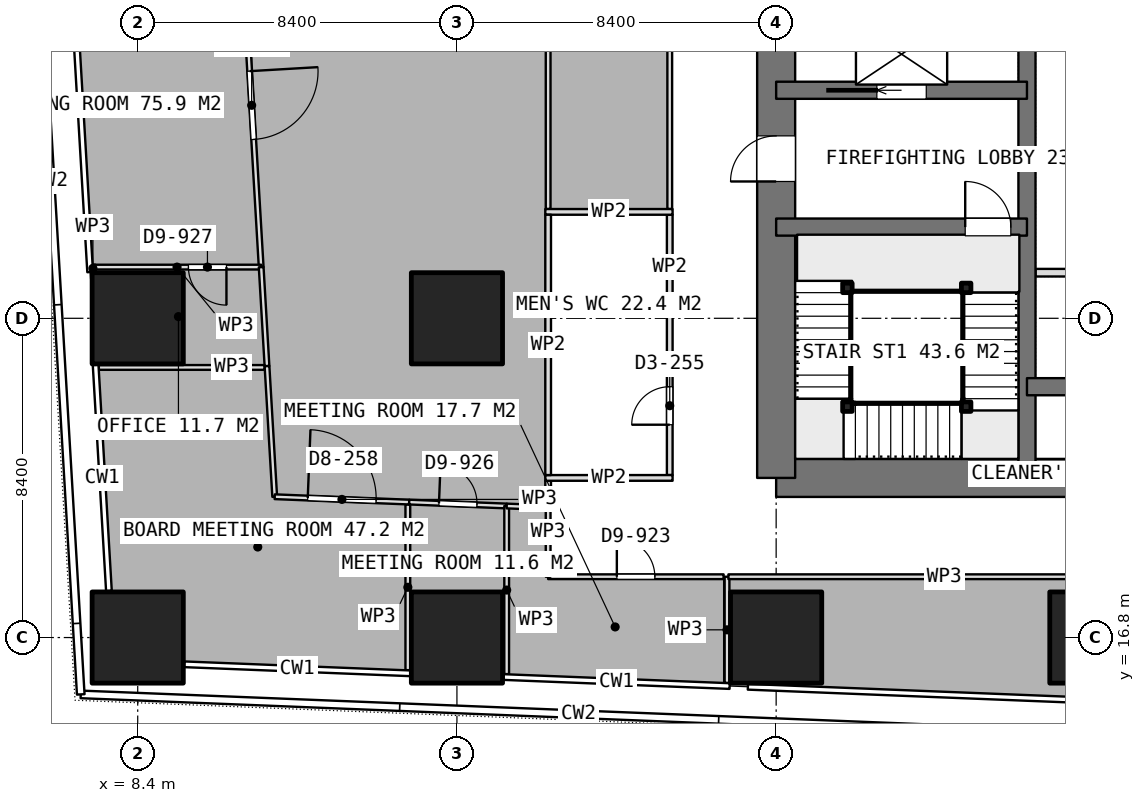
"""IFC4 building model, lengths in metres.
Left out: names, types, materials, properties, quantities, classifications, styles, units other than length and angle.
Written with IfcOpenShell. Run it as: python <this file> out.ifc"""

import sys

from ifc_helpers import new_model, si_unit, direction, frame, frame_2d, origin, origin_2d, place, context, subcontext, project, spatial, rectangle, extrude, element, fill, save


model = new_model("IFC4")
c1 = context("Model", 3, precision=1e-05, world=origin(), true_north=direction((0.0, 1.0)))
c2 = subcontext(c1, "Body", "Model", "MODEL_VIEW")
j1 = project(units=[si_unit("LENGTHUNIT", "METRE"), si_unit("PLANEANGLEUNIT", "RADIAN")], contexts=[c1])
p1 = place(None, origin())
s1 = spatial("IfcSite", under=j1, at=p1, CompositionType="ELEMENT")
p2 = place(p1, origin())
s2 = spatial("IfcBuilding", under=s1, at=p2, CompositionType="ELEMENT")
p3 = place(p2, frame((0.0, 0.0, 236.45)))
s3 = spatial("IfcBuildingStorey", under=s2, at=p3, CompositionType="ELEMENT", Elevation=236.45)
p4 = place(p3, frame((25.2, 21.0, 0.0), z_axis=(0.0, 0.0, 1.0), x_axis=(1.0, 0.0, 0.0)))
e1 = element("IfcWall", 1, at=p4, inside=s3, PredefinedType="SHEAR", context=c2, shape_type="SweptSolid", body=[
    extrude(rectangle(XDim=10.4, YDim=1.0, at=frame_2d((5.2, 0.0))), origin(), (0.0, 0.0, 1.0), 3.75),
])
p5 = place(p3, frame((25.2, 21.0, 0.0), z_axis=(0.0, 0.0, 1.0), x_axis=(0.0, 1.0, 0.0)))
e2 = element("IfcWall", 2, at=p5, inside=s3, PredefinedType="SHEAR", context=c2, shape_type="SweptSolid", body=[
    extrude(rectangle(XDim=25.2, YDim=1.0, at=frame_2d((12.6, 0.0))), origin(), (0.0, 0.0, 1.0), 3.75),
])
p6 = place(p5, frame((7.8, 0.0, 0.0)))
e3 = element("IfcOpeningElement", 3, at=p6, cuts=e2, PredefinedType="OPENING", context=c2, shape_type="SweptSolid", body=[
    extrude(rectangle(XDim=1.2, YDim=2.1, at=frame_2d((0.6, 1.05))), frame((0.0, 0.51, 0.0), z_axis=(0.0, -1.0, 0.0), x_axis=(1.0, 0.0, 0.0)), (0.0, 0.0, 1.0), 1.02),
])
p7 = place(p5, frame((14.25, 0.0, 0.0)))
e4 = element("IfcOpeningElement", 4, at=p7, cuts=e2, PredefinedType="OPENING", context=c2, shape_type="SweptSolid", body=[
    extrude(rectangle(XDim=0.9, YDim=2.1, at=frame_2d((0.45, 1.05))), frame((0.0, 0.51, 0.0), z_axis=(0.0, -1.0, 0.0), x_axis=(1.0, 0.0, 0.0)), (0.0, 0.0, 1.0), 1.02),
])
p8 = place(p5, frame((16.85, 0.0, 0.0)))
e5 = element("IfcOpeningElement", 5, at=p8, cuts=e2, PredefinedType="OPENING", context=c2, shape_type="SweptSolid", body=[
    extrude(rectangle(XDim=0.9, YDim=2.1, at=frame_2d((0.45, 1.05))), frame((0.0, 0.51, 0.0), z_axis=(0.0, -1.0, 0.0), x_axis=(1.0, 0.0, 0.0)), (0.0, 0.0, 1.0), 1.02),
])
p9 = place(p5, frame((19.025, 0.0, 0.0)))
e6 = element("IfcOpeningElement", 6, at=p9, cuts=e2, PredefinedType="OPENING", context=c2, shape_type="SweptSolid", body=[
    extrude(rectangle(XDim=1.2, YDim=2.1, at=frame_2d((0.6, 1.05))), frame((0.0, 0.51, 0.0), z_axis=(0.0, -1.0, 0.0), x_axis=(1.0, 0.0, 0.0)), (0.0, 0.0, 1.0), 1.02),
])
p10 = place(p3, frame((31.8, 21.0, 0.0), z_axis=(0.0, 0.0, 1.0), x_axis=(0.0, 1.0, 0.0)))
e7 = element("IfcWall", 7, at=p10, inside=s3, PredefinedType="SHEAR", context=c2, shape_type="SweptSolid", body=[
    extrude(rectangle(XDim=25.2, YDim=0.45, at=frame_2d((12.6, 0.0))), origin(), (0.0, 0.0, 1.0), 3.75),
])
p11 = place(p3, frame((31.8, 23.4, 0.0), z_axis=(0.0, 0.0, 1.0), x_axis=(1.0, 0.0, 0.0)))
e8 = element("IfcWall", 8, at=p11, inside=s3, PredefinedType="SHEAR", context=c2, shape_type="SweptSolid", body=[
    extrude(rectangle(XDim=3.8, YDim=0.45, at=frame_2d((1.9, 0.0))), origin(), (0.0, 0.0, 1.0), 3.75),
])
p12 = place(p3, frame((25.2, 27.6, 0.0), z_axis=(0.0, 0.0, 1.0), x_axis=(1.0, 0.0, 0.0)))
e9 = element("IfcWall", 9, at=p12, inside=s3, PredefinedType="SHEAR", context=c2, shape_type="SweptSolid", body=[
    extrude(rectangle(XDim=6.6, YDim=0.45, at=frame_2d((3.3, 0.0))), origin(), (0.0, 0.0, 1.0), 3.75),
])
p13 = place(p12, frame((4.975, 0.0, 0.0)))
e10 = element("IfcOpeningElement", 10, at=p13, cuts=e9, PredefinedType="OPENING", context=c2, shape_type="SweptSolid", body=[
    extrude(rectangle(XDim=1.2, YDim=2.1, at=frame_2d((0.6, 1.05))), frame((0.0, 0.235, 0.0), z_axis=(0.0, -1.0, 0.0), x_axis=(1.0, 0.0, 0.0)), (0.0, 0.0, 1.0), 0.47),
])
p14 = place(p3, frame((25.2, 31.2, 0.0), z_axis=(0.0, 0.0, 1.0), x_axis=(1.0, 0.0, 0.0)))
e11 = element("IfcWall", 11, at=p14, inside=s3, PredefinedType="SHEAR", context=c2, shape_type="SweptSolid", body=[
    extrude(rectangle(XDim=6.6, YDim=0.45, at=frame_2d((3.3, 0.0))), origin(), (0.0, 0.0, 1.0), 3.75),
])
p15 = place(p14, frame((2.65, 0.0, 0.0)))
e12 = element("IfcOpeningElement", 12, at=p15, cuts=e11, PredefinedType="OPENING", context=c2, shape_type="SweptSolid", body=[
    extrude(rectangle(XDim=1.3, YDim=2.1, at=frame_2d((0.65, 1.05))), frame((0.0, 0.235, 0.0), z_axis=(0.0, -1.0, 0.0), x_axis=(1.0, 0.0, 0.0)), (0.0, 0.0, 1.0), 0.47),
])
for number, where, z_axis, x_axis in (
    (13, (8.4, 16.8, 0.0), (0.0, 0.0, 1.0), (1.0, 0.0, 0.0)),
    (14, (8.4, 25.2, 0.0), (0.0, 0.0, 1.0), (1.0, 0.0, 0.0)),
    (15, (16.8, 16.8, 0.0), (0.0, 0.0, 1.0), (1.0, 0.0, 0.0)),
    (16, (16.8, 25.2, 0.0), (0.0, 0.0, 1.0), (1.0, 0.0, 0.0)),
    (17, (25.2, 16.8, 0.0), (0.0, 0.0, 1.0), (1.0, 0.0, 0.0)),
    (18, (33.6, 16.8, 0.0), (0.0, 0.0, 1.0), (1.0, 0.0, 0.0)),
):
    element("IfcColumn", number, at=place(p3, frame(where, z_axis=z_axis, x_axis=x_axis)), inside=s3, PredefinedType="COLUMN", context=c2, shape_type="SweptSolid", body=[
        extrude(rectangle(XDim=2.4, YDim=2.4, at=origin_2d()), origin(), (0.0, 0.0, 1.0), 3.75),
    ])
for number, where, z_axis, x_axis in (
    (19, (32.025, 26.4, 0.0), (0.0, 0.0, 1.0), (1.0, 0.0, 0.0)),
    (20, (32.025, 29.4, 0.0), (0.0, 0.0, 1.0), (1.0, 0.0, 0.0)),
):
    element("IfcWall", number, at=place(p3, frame(where, z_axis=z_axis, x_axis=x_axis)), inside=s3, PredefinedType="PARTITIONING", context=c2, shape_type="SweptSolid", body=[
        extrude(rectangle(XDim=3.075, YDim=0.2, at=frame_2d((1.538, 0.0))), origin(), (0.0, 0.0, 1.0), 3.4),
    ])
for number, where, z_axis, x_axis in (
    (21, (19.125, 21.0, 0.0), (0.0, 0.0, 1.0), (1.0, 0.0, 0.0)),
    (22, (19.125, 28.0, 0.0), (0.0, 0.0, 1.0), (1.0, 0.0, 0.0)),
):
    element("IfcWall", number, at=place(p3, frame(where, z_axis=z_axis, x_axis=x_axis)), inside=s3, PredefinedType="PARTITIONING", context=c2, shape_type="SweptSolid", body=[
        extrude(rectangle(XDim=3.35, YDim=0.15, at=frame_2d((1.675, 0.0))), origin(), (0.0, 0.0, 1.0), 3.4),
    ])
p16 = place(p3, frame((19.2, 21.075, 0.0), z_axis=(0.0, 0.0, 1.0), x_axis=(0.0, 1.0, 0.0)))
e23 = element("IfcWall", 23, at=p16, inside=s3, PredefinedType="PARTITIONING", context=c2, shape_type="SweptSolid", body=[
    extrude(rectangle(XDim=6.85, YDim=0.15, at=frame_2d((3.425, 0.0))), origin(), (0.0, 0.0, 1.0), 3.4),
])
p17 = place(p3, frame((22.4, 21.075, 0.0), z_axis=(0.0, 0.0, 1.0), x_axis=(0.0, 1.0, 0.0)))
e24 = element("IfcWall", 24, at=p17, inside=s3, PredefinedType="PARTITIONING", context=c2, shape_type="SweptSolid", body=[
    extrude(rectangle(XDim=6.85, YDim=0.15, at=frame_2d((3.425, 0.0))), origin(), (0.0, 0.0, 1.0), 3.4),
])
p18 = place(p17, frame((1.325, 0.0, 0.0)))
e25 = element("IfcOpeningElement", 25, at=p18, cuts=e24, PredefinedType="OPENING", context=c2, shape_type="SweptSolid", body=[
    extrude(rectangle(XDim=1.0, YDim=2.1, at=frame_2d((0.5, 1.05))), frame((0.0, 0.085, 0.0), z_axis=(0.0, -1.0, 0.0), x_axis=(1.0, 0.0, 0.0)), (0.0, 0.0, 1.0), 0.17),
])
p19 = place(p3, frame((23.907, 15.606, 0.0), z_axis=(0.0, 0.0, 1.0), x_axis=(0.0, 1.0, 0.0)))
e26 = element("IfcWall", 26, at=p19, inside=s3, PredefinedType="PARTITIONING", context=c2, shape_type="SweptSolid", body=[
    extrude(rectangle(XDim=2.794, YDim=0.125, at=frame_2d((1.397, 0.0))), origin(), (0.0, 0.0, 1.0), 3.4),
])
p20 = place(p3, frame((23.944, 18.4, 0.0), z_axis=(0.0, 0.0, 1.0), x_axis=(1.0, 0.0, 0.0)))
e27 = element("IfcWall", 27, at=p20, inside=s3, PredefinedType="PARTITIONING", context=c2, shape_type="SweptSolid", body=[
    extrude(rectangle(XDim=28.401, YDim=0.125, at=frame_2d((14.2, 0.0))), origin(), (0.0, 0.0, 1.0), 3.4),
])
p21 = place(p20, frame((13.701, 0.0, 0.0)))
e28 = element("IfcOpeningElement", 28, at=p21, cuts=e27, PredefinedType="OPENING", context=c2, shape_type="SweptSolid", body=[
    extrude(rectangle(XDim=1.0, YDim=2.1, at=frame_2d((0.5, 1.05))), frame((0.0, 0.073, 0.0), z_axis=(0.0, -1.0, 0.0), x_axis=(1.0, 0.0, 0.0)), (0.0, 0.0, 1.0), 0.145),
])
p22 = place(p3, frame((11.148, 35.061, 0.0), z_axis=(0.0, 0.0, 1.0), x_axis=(0.058740480754, -0.998273287192, 0.0)))
e29 = element("IfcWall", 29, at=p22, inside=s3, PredefinedType="PARTITIONING", context=c2, shape_type="SweptSolid", body=[
    extrude(rectangle(XDim=8.529, YDim=0.125, at=frame_2d((4.264, 0.0))), origin(), (0.0, 0.0, 1.0), 3.4),
])
p23 = place(p22, frame((3.364, 0.0, 0.0)))
e30 = element("IfcOpeningElement", 30, at=p23, cuts=e29, PredefinedType="OPENING", context=c2, shape_type="SweptSolid", body=[
    extrude(rectangle(XDim=1.8, YDim=2.1, at=frame_2d((0.9, 1.05))), frame((0.0, 0.073, 0.0), z_axis=(0.0, -1.0, 0.0), x_axis=(1.0, 0.0, 0.0)), (0.0, 0.0, 1.0), 0.145),
])
p24 = place(p3, frame((11.649, 26.547, 0.0), z_axis=(0.0, 0.0, 1.0), x_axis=(-1.0, 0.0, 0.0)))
e31 = element("IfcWall", 31, at=p24, inside=s3, PredefinedType="PARTITIONING", context=c2, shape_type="SweptSolid", body=[
    extrude(rectangle(XDim=4.428, YDim=0.125, at=frame_2d((2.214, 0.0))), origin(), (0.0, 0.0, 1.0), 3.4),
])
p25 = place(p24, frame((0.914, 0.0, 0.0)))
e32 = element("IfcOpeningElement", 32, at=p25, cuts=e31, PredefinedType="OPENING", context=c2, shape_type="SweptSolid", body=[
    extrude(rectangle(XDim=1.0, YDim=2.1, at=frame_2d((0.5, 1.05))), frame((0.0, 0.073, 0.0), z_axis=(0.0, -1.0, 0.0), x_axis=(1.0, 0.0, 0.0)), (0.0, 0.0, 1.0), 0.145),
])
p26 = place(p3, frame((11.649, 26.546, 0.0), z_axis=(0.0, 0.0, 1.0), x_axis=(0.058711043696, -0.998275018894, 0.0)))
e33 = element("IfcWall", 33, at=p26, inside=s3, PredefinedType="PARTITIONING", context=c2, shape_type="SweptSolid", body=[
    extrude(rectangle(XDim=2.607, YDim=0.125, at=frame_2d((1.304, 0.0))), origin(), (0.0, 0.0, 1.0), 3.4),
])
p27 = place(p3, frame((11.741, 23.907, 0.0), z_axis=(0.0, 0.0, 1.0), x_axis=(-1.0, 0.0, 0.0)))
e34 = element("IfcWall", 34, at=p27, inside=s3, PredefinedType="PARTITIONING", context=c2, shape_type="SweptSolid", body=[
    extrude(rectangle(XDim=4.364, YDim=0.125, at=frame_2d((2.182, 0.0))), origin(), (0.0, 0.0, 1.0), 3.4),
])
p28 = place(p3, frame((15.508, 20.303, 0.0), z_axis=(0.0, 0.0, 1.0), x_axis=(0.0, -1.0, 0.0)))
e35 = element("IfcWall", 35, at=p28, inside=s3, PredefinedType="PARTITIONING", context=c2, shape_type="SweptSolid", body=[
    extrude(rectangle(XDim=4.361, YDim=0.125, at=frame_2d((2.181, 0.0))), origin(), (0.0, 0.0, 1.0), 3.4),
])
p29 = place(p3, frame((11.802, 23.942, 0.0), z_axis=(0.0, 0.0, 1.0), x_axis=(0.058925701835, -0.998262371155, 0.0)))
e36 = element("IfcWall", 36, at=p29, inside=s3, PredefinedType="PARTITIONING", context=c2, shape_type="SweptSolid", body=[
    extrude(rectangle(XDim=3.443, YDim=0.125, at=frame_2d((1.722, 0.0))), origin(), (0.0, 0.0, 1.0), 3.4),
])
p30 = place(p3, frame((12.005, 20.505, 0.0), z_axis=(0.0, 0.0, 1.0), x_axis=(0.999208321211, -0.039783549637, 0.0)))
e37 = element("IfcWall", 37, at=p30, inside=s3, PredefinedType="PARTITIONING", context=c2, shape_type="SweptSolid", body=[
    extrude(rectangle(XDim=3.541, YDim=0.125, at=frame_2d((1.771, 0.0))), origin(), (0.0, 0.0, 1.0), 3.4),
])
p31 = place(p30, frame((0.87, 0.0, 0.0)))
e38 = element("IfcOpeningElement", 38, at=p31, cuts=e37, PredefinedType="OPENING", context=c2, shape_type="SweptSolid", body=[
    extrude(rectangle(XDim=1.8, YDim=2.1, at=frame_2d((0.9, 1.05))), frame((0.0, 0.073, 0.0), z_axis=(0.0, -1.0, 0.0), x_axis=(1.0, 0.0, 0.0)), (0.0, 0.0, 1.0), 0.145),
])
p32 = place(p3, frame((15.544, 20.364, 0.0), z_axis=(0.0, 0.0, 1.0), x_axis=(0.999194259908, -0.040135158736, 0.0)))
e39 = element("IfcWall", 39, at=p32, inside=s3, PredefinedType="PARTITIONING", context=c2, shape_type="SweptSolid", body=[
    extrude(rectangle(XDim=2.567, YDim=0.125, at=frame_2d((1.283, 0.0))), origin(), (0.0, 0.0, 1.0), 3.4),
])
p33 = place(p32, frame((0.784, 0.0, 0.0)))
e40 = element("IfcOpeningElement", 40, at=p33, cuts=e39, PredefinedType="OPENING", context=c2, shape_type="SweptSolid", body=[
    extrude(rectangle(XDim=1.0, YDim=2.1, at=frame_2d((0.5, 1.05))), frame((0.0, 0.073, 0.0), z_axis=(0.0, -1.0, 0.0), x_axis=(1.0, 0.0, 0.0)), (0.0, 0.0, 1.0), 0.145),
])
p34 = place(p3, frame((18.109, 20.261, 0.0), z_axis=(0.0, 0.0, 1.0), x_axis=(0.0, -1.0, 0.0)))
e41 = element("IfcWall", 41, at=p34, inside=s3, PredefinedType="PARTITIONING", context=c2, shape_type="SweptSolid", body=[
    extrude(rectangle(XDim=4.423, YDim=0.125, at=frame_2d((2.211, 0.0))), origin(), (0.0, 0.0, 1.0), 3.4),
])
p35 = place(p3, frame((19.2, 18.4, 0.0), z_axis=(0.0, 0.0, 1.0), x_axis=(1.0, 0.0, 0.0)))
e42 = element("IfcWall", 42, at=p35, inside=s3, PredefinedType="PARTITIONING", context=c2, shape_type="SweptSolid", body=[
    extrude(rectangle(XDim=4.617, YDim=0.125, at=frame_2d((2.309, 0.0))), origin(), (0.0, 0.0, 1.0), 3.4),
])
p36 = place(p35, frame((1.808, 0.0, 0.0)))
e43 = element("IfcOpeningElement", 43, at=p36, cuts=e42, PredefinedType="OPENING", context=c2, shape_type="SweptSolid", body=[
    extrude(rectangle(XDim=1.0, YDim=2.1, at=frame_2d((0.5, 1.05))), frame((0.0, 0.073, 0.0), z_axis=(0.0, -1.0, 0.0), x_axis=(1.0, 0.0, 0.0)), (0.0, 0.0, 1.0), 0.145),
])
p37 = place(p3, frame((18.11, 20.261, 0.0), z_axis=(0.0, 0.0, 1.0), x_axis=(0.999223679577, -0.039395915682, 0.0)))
e44 = element("IfcWall", 44, at=p37, inside=s3, PredefinedType="PARTITIONING", context=c2, shape_type="SweptSolid", body=[
    extrude(rectangle(XDim=1.091, YDim=0.125, at=frame_2d((0.545, 0.0))), origin(), (0.0, 0.0, 1.0), 3.4),
])
p38 = place(p3, frame((19.2, 20.218, 0.0), z_axis=(0.0, 0.0, 1.0), x_axis=(0.0, -1.0, 0.0)))
e45 = element("IfcWall", 45, at=p38, inside=s3, PredefinedType="PARTITIONING", context=c2, shape_type="SweptSolid", body=[
    extrude(rectangle(XDim=1.818, YDim=0.125, at=frame_2d((0.909, 0.0))), origin(), (0.0, 0.0, 1.0), 3.4),
])
p39 = place(p3, frame((19.2, 28.075, 0.0), z_axis=(0.0, 0.0, 1.0), x_axis=(0.0, 1.0, 0.0)))
e46 = element("IfcWall", 46, at=p39, inside=s3, PredefinedType="PARTITIONING", context=c2, shape_type="SweptSolid", body=[
    extrude(rectangle(XDim=25.075, YDim=0.125, at=frame_2d((12.538, 0.0))), origin(), (0.0, 0.0, 1.0), 3.4),
])
p40 = place(p3, frame((22.4, 53.15, 0.0), z_axis=(0.0, 0.0, 1.0), x_axis=(0.0, -1.0, 0.0)))
e47 = element("IfcWall", 47, at=p40, inside=s3, PredefinedType="PARTITIONING", context=c2, shape_type="SweptSolid", body=[
    extrude(rectangle(XDim=25.075, YDim=0.125, at=frame_2d((12.538, 0.0))), origin(), (0.0, 0.0, 1.0), 3.4),
])
p41 = place(p40, frame((11.975, 0.0, 0.0)))
e48 = element("IfcOpeningElement", 48, at=p41, cuts=e47, PredefinedType="OPENING", context=c2, shape_type="SweptSolid", body=[
    extrude(rectangle(XDim=1.8, YDim=2.1, at=frame_2d((0.9, 1.05))), frame((0.0, 0.073, 0.0), z_axis=(0.0, -1.0, 0.0), x_axis=(1.0, 0.0, 0.0)), (0.0, 0.0, 1.0), 0.145),
])
p42 = place(p3, frame((19.2, 20.925, 0.0), z_axis=(0.0, 0.0, 1.0), x_axis=(0.0, -1.0, 0.0)))
e49 = element("IfcWall", 49, at=p42, inside=s3, PredefinedType="PARTITIONING", context=c2, shape_type="SweptSolid", body=[
    extrude(rectangle(XDim=0.707, YDim=0.15, at=frame_2d((0.354, 0.0))), origin(), (0.0, 0.0, 1.0), 3.4),
])
p43 = place(p3, frame((7.221, 26.61, 0.0), z_axis=(0.0, 0.0, 1.0), x_axis=(0.0, -1.0, 0.0)))
e50 = element("IfcWall", 50, at=p43, inside=s3, PredefinedType="PARTITIONING", context=c2, shape_type="SweptSolid", body=[
    extrude(rectangle(XDim=0.19, YDim=0.125, at=frame_2d((0.095, 0.0))), origin(), (0.0, 0.0, 1.0), 3.4),
])
for number, where, z_axis, x_axis in (
    (51, (30.2, 26.0, 0.0), (0.0, 0.0, 1.0), (1.0, 0.0, 0.0)),
    (52, (30.2, 22.875, 0.0), (0.0, 0.0, 1.0), (1.0, 0.0, 0.0)),
    (53, (27.075, 22.875, 0.0), (0.0, 0.0, 1.0), (1.0, 0.0, 0.0)),
    (54, (27.075, 26.0, 0.0), (0.0, 0.0, 1.0), (1.0, 0.0, 0.0)),
):
    element("IfcColumn", number, at=place(p3, frame(where, z_axis=z_axis, x_axis=x_axis)), inside=s3, PredefinedType="COLUMN", context=c2, shape_type="SweptSolid", body=[
        extrude(rectangle(XDim=0.25, YDim=0.25, at=origin_2d()), origin(), (0.0, 0.0, 1.0), 3.75),
    ])
p44 = place(p6, origin())
e55 = element("IfcDoor", 55, at=p44, inside=s3, OperationType="SINGLE_SWING_LEFT", PredefinedType="DOOR", context=c2, shape_type="SweptSolid", body=[
    extrude(rectangle(XDim=1.2, YDim=2.1, at=frame_2d((0.6, 1.05))), frame((0.0, 0.025, 0.0), z_axis=(0.0, -1.0, 0.0), x_axis=(1.0, 0.0, 0.0)), (0.0, 0.0, 1.0), 0.05),
])
fill(e3, e55)
p45 = place(p15, origin())
e56 = element("IfcDoor", 56, at=p45, inside=s3, OperationType="SLIDING_TO_LEFT", PredefinedType="USERDEFINED", context=c2, shape_type="SweptSolid", body=[
    extrude(rectangle(XDim=1.3, YDim=2.1, at=frame_2d((0.65, 1.05))), frame((0.0, 0.025, 0.0), z_axis=(0.0, -1.0, 0.0), x_axis=(1.0, 0.0, 0.0)), (0.0, 0.0, 1.0), 0.05),
])
fill(e12, e56)
p46 = place(p18, origin())
e57 = element("IfcDoor", 57, at=p46, inside=s3, OperationType="SINGLE_SWING_LEFT", PredefinedType="DOOR", context=c2, shape_type="SweptSolid", body=[
    extrude(rectangle(XDim=1.0, YDim=2.1, at=frame_2d((0.5, 1.05))), frame((0.0, 0.025, 0.0), z_axis=(0.0, -1.0, 0.0), x_axis=(1.0, 0.0, 0.0)), (0.0, 0.0, 1.0), 0.05),
])
fill(e25, e57)
p47 = place(p23, origin())
e58 = element("IfcDoor", 58, at=p47, inside=s3, OperationType="DOUBLE_DOOR_SINGLE_SWING", PredefinedType="DOOR", context=c2, shape_type="SweptSolid", body=[
    extrude(rectangle(XDim=1.8, YDim=2.1, at=frame_2d((0.9, 1.05))), frame((0.0, 0.025, 0.0), z_axis=(0.0, -1.0, 0.0), x_axis=(1.0, 0.0, 0.0)), (0.0, 0.0, 1.0), 0.05),
])
fill(e30, e58)
p48 = place(p31, origin())
e59 = element("IfcDoor", 59, at=p48, inside=s3, OperationType="DOUBLE_DOOR_SINGLE_SWING", PredefinedType="DOOR", context=c2, shape_type="SweptSolid", body=[
    extrude(rectangle(XDim=1.8, YDim=2.1, at=frame_2d((0.9, 1.05))), frame((0.0, 0.025, 0.0), z_axis=(0.0, -1.0, 0.0), x_axis=(1.0, 0.0, 0.0)), (0.0, 0.0, 1.0), 0.05),
])
fill(e38, e59)
p49 = place(p33, origin())
e60 = element("IfcDoor", 60, at=p49, inside=s3, OperationType="SINGLE_SWING_LEFT", PredefinedType="DOOR", context=c2, shape_type="SweptSolid", body=[
    extrude(rectangle(XDim=1.0, YDim=2.1, at=frame_2d((0.5, 1.05))), frame((0.0, 0.025, 0.0), z_axis=(0.0, -1.0, 0.0), x_axis=(1.0, 0.0, 0.0)), (0.0, 0.0, 1.0), 0.05),
])
fill(e40, e60)
p50 = place(p36, origin())
e61 = element("IfcDoor", 61, at=p50, inside=s3, OperationType="SINGLE_SWING_LEFT", PredefinedType="DOOR", context=c2, shape_type="SweptSolid", body=[
    extrude(rectangle(XDim=1.0, YDim=2.1, at=frame_2d((0.5, 1.05))), frame((0.0, 0.025, 0.0), z_axis=(0.0, -1.0, 0.0), x_axis=(1.0, 0.0, 0.0)), (0.0, 0.0, 1.0), 0.05),
])
fill(e43, e61)
p51 = place(p25, origin())
e62 = element("IfcDoor", 62, at=p51, inside=s3, OperationType="SINGLE_SWING_LEFT", PredefinedType="DOOR", context=c2, shape_type="SweptSolid", body=[
    extrude(rectangle(XDim=1.0, YDim=2.1, at=frame_2d((0.5, 1.05))), frame((0.0, 0.025, 0.0), z_axis=(0.0, -1.0, 0.0), x_axis=(1.0, 0.0, 0.0)), (0.0, 0.0, 1.0), 0.05),
])
fill(e32, e62)
p52 = place(p13, origin())
e63 = element("IfcDoor", 63, at=p52, inside=s3, OperationType="SINGLE_SWING_RIGHT", PredefinedType="DOOR", context=c2, shape_type="SweptSolid", body=[
    extrude(rectangle(XDim=1.2, YDim=2.1, at=frame_2d((0.6, 1.05))), frame((0.0, 0.025, 0.0), z_axis=(0.0, -1.0, 0.0), x_axis=(1.0, 0.0, 0.0)), (0.0, 0.0, 1.0), 0.05),
])
fill(e10, e63)
save(model, sys.argv[1])
